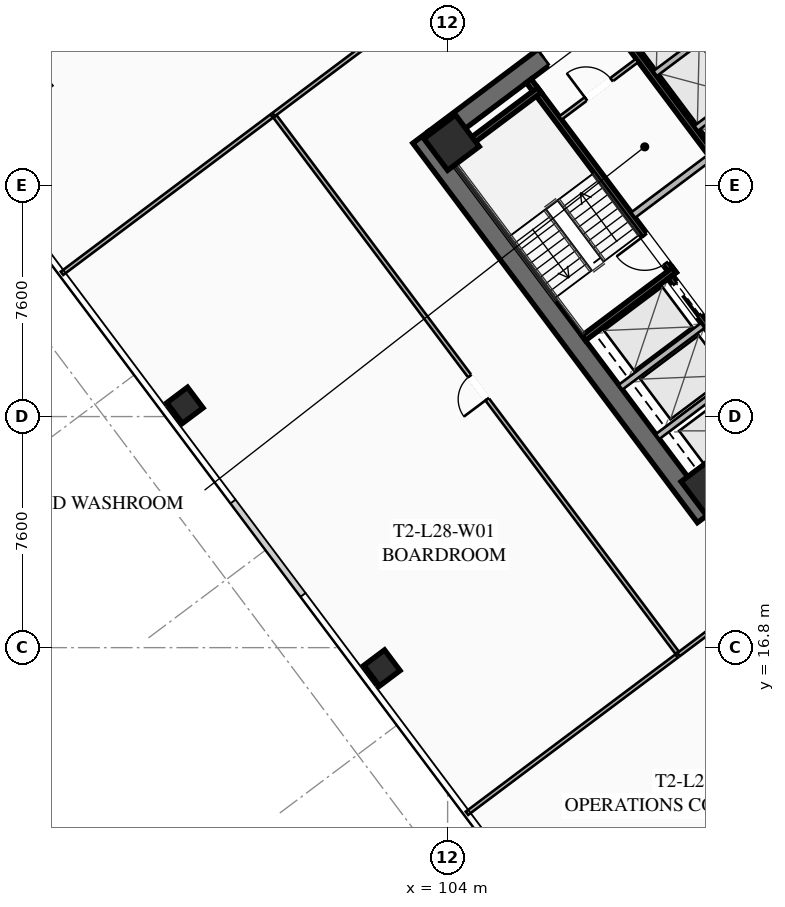
"""IFC4 building model, lengths in metres.
Left out: names, types, materials, properties, quantities, classifications, styles, units other than length and angle.
Written with IfcOpenShell. Run it as: python <this file> out.ifc"""

import sys

from ifc_helpers import new_model, si_unit, direction, frame, frame_2d, origin, origin_2d, place, context, subcontext, project, spatial, rectangle, hollow_rectangle, extrude, element, fill, save


model = new_model("IFC4")
c1 = context("Model", 3, precision=1e-05, world=origin(), true_north=direction((0.0, 1.0)))
c2 = subcontext(c1, "Body", "Model", "MODEL_VIEW")
j1 = project(units=[si_unit("LENGTHUNIT", "METRE"), si_unit("PLANEANGLEUNIT", "RADIAN")], contexts=[c1])
p1 = place(None, origin())
s1 = spatial("IfcSite", under=j1, at=p1, CompositionType="ELEMENT")
p2 = place(p1, origin())
s2 = spatial("IfcBuilding", under=s1, at=p2, CompositionType="ELEMENT")
p3 = place(p2, frame((0.0, 0.0, 106.25)))
s3 = spatial("IfcBuildingStorey", under=s2, at=p3, CompositionType="ELEMENT", Elevation=106.25)
p4 = place(p3, frame((112.476, 21.107, 0.0), z_axis=(0.0, 0.0, 1.0), x_axis=(-0.600005007985, 0.799996243986, 0.0)))
e1 = element("IfcWall", 1, at=p4, inside=s3, PredefinedType="SHEAR", context=c2, shape_type="SweptSolid", body=[
    extrude(rectangle(XDim=15.6, YDim=0.65, at=frame_2d((7.8, 0.0))), origin(), (0.0, 0.0, 1.0), 3.55),
])
p5 = place(p3, frame((124.429, 30.478, 0.0), z_axis=(0.0, 0.0, 1.0), x_axis=(-0.799998028465, -0.600002628705, 0.0)))
e2 = element("IfcWall", 2, at=p5, inside=s3, PredefinedType="SHEAR", context=c2, shape_type="SweptSolid", body=[
    extrude(rectangle(XDim=14.86, YDim=0.65, at=frame_2d((7.43, 0.0))), origin(), (0.0, 0.0, 1.0), 3.55),
])
p6 = place(p5, frame((9.13, 0.0, 0.0)))
e3 = element("IfcOpeningElement", 3, at=p6, cuts=e2, PredefinedType="OPENING", context=c2, shape_type="SweptSolid", body=[
    extrude(rectangle(XDim=1.25, YDim=2.25, at=frame_2d((0.625, 1.125))), frame((0.0, 0.335, 0.0), z_axis=(0.0, -1.0, 0.0), x_axis=(1.0, 0.0, 0.0)), (0.0, 0.0, 1.0), 0.67),
])
p7 = place(p5, frame((4.08, 0.0, 0.0)))
e4 = element("IfcOpeningElement", 4, at=p7, cuts=e2, PredefinedType="OPENING", context=c2, shape_type="SweptSolid", body=[
    extrude(rectangle(XDim=1.25, YDim=2.25, at=frame_2d((0.625, 1.125))), frame((0.0, 0.335, 0.0), z_axis=(0.0, -1.0, 0.0), x_axis=(1.0, 0.0, 0.0)), (0.0, 0.0, 1.0), 0.67),
])
p8 = place(p3, frame((103.571, 33.522, 0.0), z_axis=(0.0, 0.0, 1.0), x_axis=(0.799998028465, 0.600002628705, 0.0)))
e5 = element("IfcWall", 5, at=p8, inside=s3, PredefinedType="SHEAR", context=c2, shape_type="SweptSolid", body=[
    extrude(rectangle(XDim=14.86, YDim=0.65, at=frame_2d((7.43, 0.0))), origin(), (0.0, 0.0, 1.0), 3.55),
])
p9 = place(p8, frame((4.48, 0.0, 0.0)))
e6 = element("IfcOpeningElement", 6, at=p9, cuts=e5, PredefinedType="OPENING", context=c2, shape_type="SweptSolid", body=[
    extrude(rectangle(XDim=1.25, YDim=2.25, at=frame_2d((0.625, 1.125))), frame((0.0, 0.335, 0.0), z_axis=(0.0, -1.0, 0.0), x_axis=(1.0, 0.0, 0.0)), (0.0, 0.0, 1.0), 0.67),
])
p10 = place(p8, frame((9.53, 0.0, 0.0)))
e7 = element("IfcOpeningElement", 7, at=p10, cuts=e5, PredefinedType="OPENING", context=c2, shape_type="SweptSolid", body=[
    extrude(rectangle(XDim=1.25, YDim=2.25, at=frame_2d((0.625, 1.125))), frame((0.0, 0.335, 0.0), z_axis=(0.0, -1.0, 0.0), x_axis=(1.0, 0.0, 0.0)), (0.0, 0.0, 1.0), 0.67),
])
for number, where, z_axis, x_axis in (
    (8, (112.59, 22.13, 0.0), (0.0, 0.0, 1.0), (0.8, 0.6, 0.0)),
    (9, (104.13, 33.41, 0.0), (0.0, 0.0, 1.0), (0.8, 0.6, 0.0)),
):
    element("IfcColumn", number, at=place(p3, frame(where, z_axis=z_axis, x_axis=x_axis)), inside=s3, PredefinedType="COLUMN", context=c2, shape_type="SweptSolid", body=[
        extrude(hollow_rectangle(XDim=1.3, YDim=1.3, WallThickness=0.05, at=origin_2d()), origin(), (0.0, 0.0, 1.0), 3.25),
    ])
for number, where, z_axis, x_axis in (
    (10, (95.36, 24.77, 0.0), (0.0, 0.0, 1.0), (0.8, 0.6, 0.0)),
    (11, (101.84, 16.13, 0.0), (0.0, 0.0, 1.0), (0.8, 0.6, 0.0)),
):
    element("IfcColumn", number, at=place(p3, frame(where, z_axis=z_axis, x_axis=x_axis)), inside=s3, PredefinedType="COLUMN", context=c2, shape_type="SweptSolid", body=[
        extrude(hollow_rectangle(XDim=0.85, YDim=0.85, WallThickness=0.035, at=origin_2d()), origin(), (0.0, 0.0, 1.0), 3.25),
    ])
p11 = place(p3, frame((111.44, 29.08, 0.0), z_axis=(0.0, 0.0, 1.0), x_axis=(-0.600009827119, 0.799992629566, 0.0)))
e12 = element("IfcWall", 12, at=p11, inside=s3, PredefinedType="SHEAR", context=c2, shape_type="SweptSolid", body=[
    extrude(rectangle(XDim=7.95, YDim=0.2, at=frame_2d((3.975, 0.0))), origin(), (0.0, 0.0, 1.0), 3.25),
])
p12 = place(p11, frame((0.45, 0.0, 0.0)))
e13 = element("IfcOpeningElement", 13, at=p12, cuts=e12, PredefinedType="OPENING", context=c2, shape_type="SweptSolid", body=[
    extrude(rectangle(XDim=1.15, YDim=2.2, at=frame_2d((0.575, 1.1))), frame((0.0, 0.11, 0.0), z_axis=(0.0, -1.0, 0.0), x_axis=(1.0, 0.0, 0.0)), (0.0, 0.0, 1.0), 0.22),
])
for number, where, z_axis, x_axis in (
    (14, (108.476, 26.982, 0.0), (0.0, 0.0, 1.0), (0.8, 0.6, 0.0)),
    (15, (104.036, 32.902, 0.0), (0.0, 0.0, 1.0), (0.8, 0.6, 0.0)),
):
    element("IfcWall", number, at=place(p3, frame(where, z_axis=z_axis, x_axis=x_axis)), inside=s3, PredefinedType="SHEAR", context=c2, shape_type="SweptSolid", body=[
        extrude(rectangle(XDim=3.73, YDim=0.2, at=frame_2d((1.865, 0.0))), origin(), (0.0, 0.0, 1.0), 3.25),
    ])
p13 = place(p3, frame((117.938, 26.016, 0.0), z_axis=(0.0, 0.0, 1.0), x_axis=(-0.600005463273, 0.799995902516, 0.0)))
e16 = element("IfcWall", 16, at=p13, inside=s3, PredefinedType="SHEAR", context=c2, shape_type="SweptSolid", body=[
    extrude(rectangle(XDim=14.3, YDim=0.2, at=frame_2d((7.15, 0.0))), origin(), (0.0, 0.0, 1.0), 3.25),
])
p14 = place(p3, frame((110.104, 31.028, 0.0), z_axis=(0.0, 0.0, 1.0), x_axis=(0.800018601094, 0.59997519774, 0.0)))
e17 = element("IfcWall", 17, at=p14, inside=s3, PredefinedType="SOLIDWALL", context=c2, shape_type="SweptSolid", body=[
    extrude(rectangle(XDim=3.15, YDim=0.22, at=frame_2d((1.575, 0.0))), origin(), (0.0, 0.0, 1.0), 2.393),
])
p15 = place(p3, frame((115.13, 23.91, 0.0), z_axis=(0.0, 0.0, 1.0), x_axis=(-0.599975393228, 0.800018454488, 0.0)))
e18 = element("IfcWall", 18, at=p15, inside=s3, PredefinedType="SHEAR", context=c2, shape_type="SweptSolid", body=[
    extrude(rectangle(XDim=6.35, YDim=0.2, at=frame_2d((3.175, 0.0))), origin(), (0.0, 0.0, 1.0), 3.25),
])
p16 = place(p15, frame((4.775, 0.0, 0.0)))
e19 = element("IfcOpeningElement", 19, at=p16, cuts=e18, PredefinedType="OPENING", context=c2, shape_type="SweptSolid", body=[
    extrude(rectangle(XDim=1.3, YDim=2.25, at=frame_2d((0.65, 1.125))), frame((0.0, 0.11, 0.0), z_axis=(0.0, -1.0, 0.0), x_axis=(1.0, 0.0, 0.0)), (0.0, 0.0, 1.0), 0.22),
])
p17 = place(p15, frame((2.775, 0.0, 0.0)))
e20 = element("IfcOpeningElement", 20, at=p17, cuts=e18, PredefinedType="OPENING", context=c2, shape_type="SweptSolid", body=[
    extrude(rectangle(XDim=1.3, YDim=2.25, at=frame_2d((0.65, 1.125))), frame((0.0, 0.11, 0.0), z_axis=(0.0, -1.0, 0.0), x_axis=(1.0, 0.0, 0.0)), (0.0, 0.0, 1.0), 0.22),
])
p18 = place(p15, frame((0.575, 0.0, 0.0)))
e21 = element("IfcOpeningElement", 21, at=p18, cuts=e18, PredefinedType="OPENING", context=c2, shape_type="SweptSolid", body=[
    extrude(rectangle(XDim=1.3, YDim=2.25, at=frame_2d((0.65, 1.125))), frame((0.0, 0.11, 0.0), z_axis=(0.0, -1.0, 0.0), x_axis=(1.0, 0.0, 0.0)), (0.0, 0.0, 1.0), 0.22),
])
for number, where, z_axis, x_axis in (
    (22, (110.906, 23.742, 0.0), (0.0, 0.0, 1.0), (0.8, 0.6, 0.0)),
    (23, (109.688, 25.366, 0.0), (0.0, 0.0, 1.0), (0.8, 0.6, 0.0)),
):
    element("IfcWall", number, at=place(p3, frame(where, z_axis=z_axis, x_axis=x_axis)), inside=s3, PredefinedType="SOLIDWALL", context=c2, shape_type="SweptSolid", body=[
        extrude(rectangle(XDim=3.38, YDim=0.2, at=frame_2d((1.69, 0.0))), origin(), (0.0, 0.0, 1.0), 3.25),
    ])
p19 = place(p3, frame((107.71, 34.22, 0.0), z_axis=(0.0, 0.0, 1.0), x_axis=(0.799981399002, 0.60002480053, 0.0)))
e24 = element("IfcWall", 24, at=p19, inside=s3, PredefinedType="PARTITIONING", context=c2, shape_type="SweptSolid", body=[
    extrude(rectangle(XDim=3.15, YDim=0.135, at=frame_2d((1.575, 0.0))), origin(), (0.0, 0.0, 1.0), 2.393),
])
p20 = place(p19, frame((1.05, 0.0, 0.0)))
e25 = element("IfcOpeningElement", 25, at=p20, cuts=e24, PredefinedType="OPENING", context=c2, shape_type="SweptSolid", body=[
    extrude(rectangle(XDim=1.05, YDim=2.2, at=frame_2d((0.525, 1.1))), frame((0.0, 0.077, 0.0), z_axis=(0.0, -1.0, 0.0), x_axis=(1.0, 0.0, 0.0)), (0.0, 0.0, 1.0), 0.155),
])
p21 = place(p3, frame((115.11, 33.27, 0.0), z_axis=(0.0, 0.0, 1.0), x_axis=(-0.600011488909, 0.79999138319, 0.0)))
e26 = element("IfcWall", 26, at=p21, inside=s3, PredefinedType="SOLIDWALL", context=c2, shape_type="SweptSolid", body=[
    extrude(rectangle(XDim=6.8, YDim=0.2, at=frame_2d((3.4, 0.0))), origin(), (0.0, 0.0, 1.0), 3.25),
])
p22 = place(p21, frame((0.575, 0.0, 0.0)))
e27 = element("IfcOpeningElement", 27, at=p22, cuts=e26, PredefinedType="OPENING", context=c2, shape_type="SweptSolid", body=[
    extrude(rectangle(XDim=1.1, YDim=2.2, at=frame_2d((0.55, 1.1))), frame((0.0, 0.11, 0.0), z_axis=(0.0, -1.0, 0.0), x_axis=(1.0, 0.0, 0.0)), (0.0, 0.0, 1.0), 0.22),
])
p23 = place(p21, frame((2.825, 0.0, 0.0)))
e28 = element("IfcOpeningElement", 28, at=p23, cuts=e26, PredefinedType="OPENING", context=c2, shape_type="SweptSolid", body=[
    extrude(rectangle(XDim=1.1, YDim=2.2, at=frame_2d((0.55, 1.1))), frame((0.0, 0.11, 0.0), z_axis=(0.0, -1.0, 0.0), x_axis=(1.0, 0.0, 0.0)), (0.0, 0.0, 1.0), 0.22),
])
p24 = place(p21, frame((5.075, 0.0, 0.0)))
e29 = element("IfcOpeningElement", 29, at=p24, cuts=e26, PredefinedType="OPENING", context=c2, shape_type="SweptSolid", body=[
    extrude(rectangle(XDim=1.1, YDim=2.2, at=frame_2d((0.55, 1.1))), frame((0.0, 0.11, 0.0), z_axis=(0.0, -1.0, 0.0), x_axis=(1.0, 0.0, 0.0)), (0.0, 0.0, 1.0), 0.22),
])
p25 = place(p3, frame((112.176, 33.882, 0.0), z_axis=(0.0, 0.0, 1.0), x_axis=(0.8, 0.6, 0.0)))
e30 = element("IfcWall", 30, at=p25, inside=s3, PredefinedType="SOLIDWALL", context=c2, shape_type="SweptSolid", body=[
    extrude(rectangle(XDim=1.88, YDim=0.2, at=frame_2d((0.94, 0.0))), origin(), (0.0, 0.0, 1.0), 3.25),
])
p26 = place(p3, frame((110.826, 35.682, 0.0), z_axis=(0.0, 0.0, 1.0), x_axis=(0.799984418148, 0.600020775241, 0.0)))
e31 = element("IfcWall", 31, at=p26, inside=s3, PredefinedType="SOLIDWALL", context=c2, shape_type="SweptSolid", body=[
    extrude(rectangle(XDim=1.88, YDim=0.2, at=frame_2d((0.94, 0.0))), origin(), (0.0, 0.0, 1.0), 3.25),
])
p27 = place(p3, frame((98.276, 34.332, 0.0), z_axis=(0.0, 0.0, 1.0), x_axis=(0.800003113347, 0.599995848849, 0.0)))
e32 = element("IfcWall", 32, at=p27, inside=s3, PredefinedType="PARTITIONING", context=c2, shape_type="SweptSolid", body=[
    extrude(rectangle(XDim=28.23, YDim=0.135, at=frame_2d((14.115, 0.0))), origin(), (0.0, 0.0, 1.0), 2.393),
])
p28 = place(p27, frame((26.98, 0.0, 0.0)))
e33 = element("IfcOpeningElement", 33, at=p28, cuts=e32, PredefinedType="OPENING", context=c2, shape_type="SweptSolid", body=[
    extrude(rectangle(XDim=0.95, YDim=2.05, at=frame_2d((0.475, 1.025))), frame((0.0, 0.077, 0.0), z_axis=(0.0, -1.0, 0.0), x_axis=(1.0, 0.0, 0.0)), (0.0, 0.0, 1.0), 0.155),
])
p29 = place(p3, frame((134.18, 33.51, 0.0), z_axis=(0.0, 0.0, 1.0), x_axis=(-0.8, -0.6, 0.0)))
e34 = element("IfcWall", 34, at=p29, inside=s3, PredefinedType="PARTITIONING", context=c2, shape_type="SweptSolid", body=[
    extrude(rectangle(XDim=28.23, YDim=0.135, at=frame_2d((14.115, 0.0))), origin(), (0.0, 0.0, 1.0), 2.393),
])
p30 = place(p29, frame((25.637, 0.0, 0.0)))
e35 = element("IfcOpeningElement", 35, at=p30, cuts=e34, PredefinedType="OPENING", context=c2, shape_type="SweptSolid", body=[
    extrude(rectangle(XDim=0.95, YDim=2.05, at=frame_2d((0.475, 1.025))), frame((0.0, 0.077, 0.0), z_axis=(0.0, -1.0, 0.0), x_axis=(1.0, 0.0, 0.0)), (0.0, 0.0, 1.0), 0.155),
])
p31 = place(p29, frame((0.38, 0.0, 0.0)))
e36 = element("IfcOpeningElement", 36, at=p31, cuts=e34, PredefinedType="OPENING", context=c2, shape_type="SweptSolid", body=[
    extrude(rectangle(XDim=0.95, YDim=2.05, at=frame_2d((0.475, 1.025))), frame((0.0, 0.077, 0.0), z_axis=(0.0, -1.0, 0.0), x_axis=(1.0, 0.0, 0.0)), (0.0, 0.0, 1.0), 0.155),
])
p32 = place(p3, frame((111.548, 16.636, 0.0), z_axis=(0.0, 0.0, 1.0), x_axis=(-0.600001772333, 0.799998670747, 0.0)))
e37 = element("IfcWall", 37, at=p32, inside=s3, PredefinedType="PARTITIONING", context=c2, shape_type="SweptSolid", body=[
    extrude(rectangle(XDim=22.04, YDim=0.135, at=frame_2d((11.02, 0.0))), origin(), (0.0, 0.0, 1.0), 2.393),
])
p33 = place(p32, frame((10.418, 0.0, 0.0)))
e38 = element("IfcOpeningElement", 38, at=p33, cuts=e37, PredefinedType="OPENING", context=c2, shape_type="SweptSolid", body=[
    extrude(rectangle(XDim=0.95, YDim=2.05, at=frame_2d((0.475, 1.025))), frame((0.0, 0.077, 0.0), z_axis=(0.0, -1.0, 0.0), x_axis=(1.0, 0.0, 0.0)), (0.0, 0.0, 1.0), 0.155),
])
for number, where, z_axis, x_axis in (
    (39, (98.212, 34.284, 0.0), (0.0, 0.0, 1.0), (-0.8, -0.6, 0.0)),
    (40, (104.636, 11.352, 0.0), (0.0, 0.0, 1.0), (0.8, 0.6, 0.0)),
):
    element("IfcWall", number, at=place(p3, frame(where, z_axis=z_axis, x_axis=x_axis)), inside=s3, PredefinedType="PARTITIONING", context=c2, shape_type="SweptSolid", body=[
        extrude(rectangle(XDim=8.62, YDim=0.135, at=frame_2d((4.31, 0.0))), origin(), (0.0, 0.0, 1.0), 2.393),
    ])
p34 = place(p9, origin())
e41 = element("IfcDoor", 41, at=p34, inside=s3, OperationType="SINGLE_SWING_LEFT", PredefinedType="DOOR", context=c2, shape_type="SweptSolid", body=[
    extrude(rectangle(XDim=1.25, YDim=2.25, at=frame_2d((0.625, 1.125))), frame((0.0, 0.025, 0.0), z_axis=(0.0, -1.0, 0.0), x_axis=(1.0, 0.0, 0.0)), (0.0, 0.0, 1.0), 0.05),
])
fill(e6, e41)
p35 = place(p12, origin())
e42 = element("IfcDoor", 42, at=p35, inside=s3, OperationType="SINGLE_SWING_RIGHT", PredefinedType="DOOR", context=c2, shape_type="SweptSolid", body=[
    extrude(rectangle(XDim=1.15, YDim=2.2, at=frame_2d((0.575, 1.1))), frame((0.0, 0.025, 0.0), z_axis=(0.0, -1.0, 0.0), x_axis=(1.0, 0.0, 0.0)), (0.0, 0.0, 1.0), 0.05),
])
fill(e13, e42)
p36 = place(p20, origin())
e43 = element("IfcDoor", 43, at=p36, inside=s3, OperationType="SINGLE_SWING_LEFT", PredefinedType="DOOR", context=c2, shape_type="SweptSolid", body=[
    extrude(rectangle(XDim=1.05, YDim=2.2, at=frame_2d((0.525, 1.1))), frame((0.0, 0.025, 0.0), z_axis=(0.0, -1.0, 0.0), x_axis=(1.0, 0.0, 0.0)), (0.0, 0.0, 1.0), 0.05),
])
fill(e25, e43)
p37 = place(p33, origin())
e44 = element("IfcDoor", 44, at=p37, inside=s3, OperationType="SINGLE_SWING_LEFT", PredefinedType="DOOR", context=c2, shape_type="SweptSolid", body=[
    extrude(rectangle(XDim=0.95, YDim=2.05, at=frame_2d((0.475, 1.025))), frame((0.0, 0.025, 0.0), z_axis=(0.0, -1.0, 0.0), x_axis=(1.0, 0.0, 0.0)), (0.0, 0.0, 1.0), 0.05),
])
fill(e38, e44)
p38 = place(p16, origin())
e45 = element("IfcDoor", 45, at=p38, inside=s3, OperationType="SLIDING_TO_LEFT", PredefinedType="DOOR", context=c2, shape_type="SweptSolid", body=[
    extrude(rectangle(XDim=1.3, YDim=2.25, at=frame_2d((0.65, 1.125))), frame((0.0, 0.025, 0.0), z_axis=(0.0, -1.0, 0.0), x_axis=(1.0, 0.0, 0.0)), (0.0, 0.0, 1.0), 0.05),
])
fill(e19, e45)
save(model, sys.argv[1])
